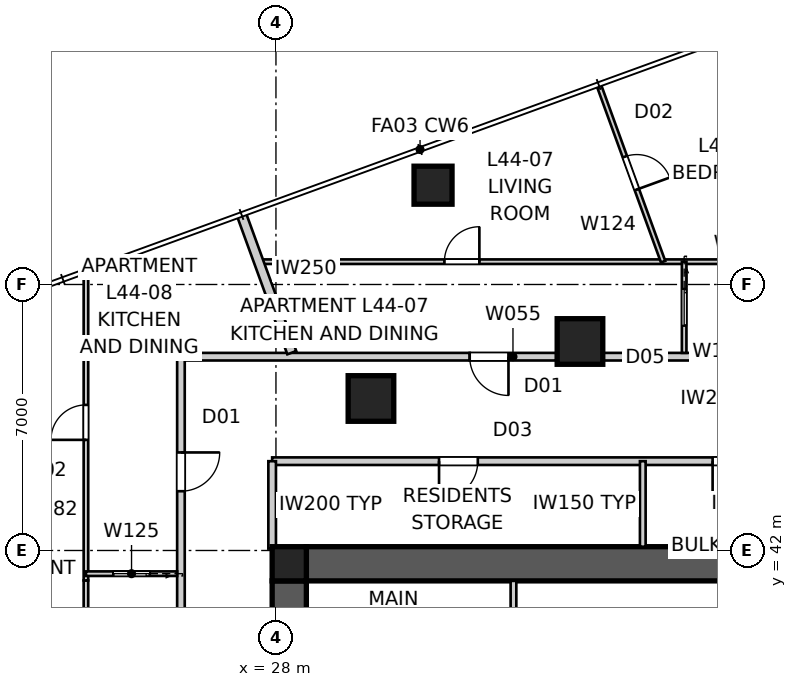
"""IFC4 building model, lengths in metres.
Left out: names, types, materials, properties, quantities, classifications, styles, units other than length and angle.
Written with IfcOpenShell. Run it as: python <this file> out.ifc"""

import sys

from ifc_helpers import new_model, si_unit, direction, frame, frame_2d, origin, origin_2d, place, context, subcontext, project, spatial, polyline, rectangle, outline, extrude, element, fill, save


model = new_model("IFC4")
c1 = context("Model", 3, precision=1e-05, world=origin(), true_north=direction((0.0, 1.0)))
c2 = subcontext(c1, "Body", "Model", "MODEL_VIEW")
j1 = project(units=[si_unit("LENGTHUNIT", "METRE"), si_unit("PLANEANGLEUNIT", "RADIAN")], contexts=[c1])
p1 = place(None, origin())
s1 = spatial("IfcSite", under=j1, at=p1, CompositionType="ELEMENT")
p2 = place(p1, origin())
s2 = spatial("IfcBuilding", under=s1, at=p2, CompositionType="ELEMENT")
p3 = place(p2, frame((0.0, 0.0, 160.8)))
s3 = spatial("IfcBuildingStorey", under=s2, at=p3, CompositionType="ELEMENT", Elevation=160.8)
p4 = place(p3, frame((28.8, 41.65, 0.0), z_axis=(0.0, 0.0, 1.0), x_axis=(1.0, 0.0, 0.0)))
e1 = element("IfcWall", 1, at=p4, inside=s3, PredefinedType="SHEAR", context=c2, shape_type="SweptSolid", body=[
    extrude(outline(polyline([(0.0, -0.45), (22.4, -0.45), (22.4, -0.025), (22.85, -0.025), (22.85, 0.025), (22.4, 0.025), (22.4, 0.45), (0.0, 0.45), (0.0, 0.025), (-0.45, 0.025), (-0.45, -0.025), (0.0, -0.025), (0.0, -0.45)])), origin(), (0.0, 0.0, 1.0), 3.4),
])
p5 = place(p3, frame((28.35, 41.2, 0.0), z_axis=(0.0, 0.0, 1.0), x_axis=(0.0, -1.0, 0.0)))
e2 = element("IfcWall", 2, at=p5, inside=s3, PredefinedType="SHEAR", context=c2, shape_type="SweptSolid", body=[
    extrude(outline(polyline([(0.0, -0.45), (22.4, -0.45), (22.4, -0.025), (22.85, -0.025), (22.85, 0.025), (22.4, 0.025), (22.4, 0.45), (0.0, 0.45), (0.0, 0.025), (-0.45, 0.025), (-0.45, -0.025), (0.0, -0.025), (0.0, -0.45)])), origin(), (0.0, 0.0, 1.0), 3.4),
])
p6 = place(p5, frame((11.14, 0.0, 0.0)))
e3 = element("IfcOpeningElement", 3, at=p6, cuts=e2, PredefinedType="OPENING", context=c2, shape_type="SweptSolid", body=[
    extrude(rectangle(XDim=1.02, YDim=2.4, at=frame_2d((0.51, 1.2))), frame((0.0, 0.46, 0.0), z_axis=(0.0, -1.0, 0.0), x_axis=(1.0, 0.0, 0.0)), (0.0, 0.0, 1.0), 0.92),
])
p7 = place(p3, frame((28.35, 41.65, 0.0), z_axis=(0.0, 0.0, 1.0), x_axis=(1.0, 0.0, 0.0)))
e4 = element("IfcColumn", 4, at=p7, inside=s3, PredefinedType="COLUMN", context=c2, shape_type="SweptSolid", body=[
    extrude(rectangle(XDim=0.9, YDim=0.9, at=origin_2d()), origin(), (0.0, 0.0, 1.0), 3.4),
])
p8 = place(p3, frame((32.134, 51.613, 0.0), z_axis=(0.0, 0.0, 1.0), x_axis=(1.0, 0.0, 0.0)))
e5 = element("IfcColumn", 5, at=p8, inside=s3, PredefinedType="COLUMN", context=c2, shape_type="SweptSolid", body=[
    extrude(rectangle(XDim=1.0, YDim=1.0, at=origin_2d()), origin(), (0.0, 0.0, 1.0), 3.4),
])
for number, where, z_axis, x_axis in (
    (6, (36.0, 47.5, 0.0), (0.0, 0.0, 1.0), (1.0, 0.0, 0.0)),
    (7, (30.5, 46.0, 0.0), (0.0, 0.0, 1.0), (1.0, 0.0, 0.0)),
):
    element("IfcColumn", number, at=place(p3, frame(where, z_axis=z_axis, x_axis=x_axis)), inside=s3, PredefinedType="COLUMN", context=c2, shape_type="SweptSolid", body=[
        extrude(rectangle(XDim=1.2, YDim=1.2, at=origin_2d()), origin(), (0.0, 0.0, 1.0), 3.4),
    ])
p9 = place(p3, frame((44.625, 47.1, 0.0), z_axis=(0.0, 0.0, 1.0), x_axis=(-1.0, 0.0, 0.0)))
e8 = element("IfcWall", 8, at=p9, inside=s3, PredefinedType="PARTITIONING", context=c2, shape_type="SweptSolid", body=[
    extrude(rectangle(XDim=9.25, YDim=0.2, at=frame_2d((4.625, 0.0))), origin(), (0.0, 0.0, 1.0), 3.25),
])
p10 = place(p3, frame((35.375, 47.1, 0.0), z_axis=(0.0, 0.0, 1.0), x_axis=(-1.0, 0.0, 0.0)))
e9 = element("IfcWall", 9, at=p10, inside=s3, PredefinedType="PARTITIONING", context=c2, shape_type="SweptSolid", body=[
    extrude(rectangle(XDim=2.277, YDim=0.2, at=frame_2d((1.138, 0.0))), origin(), (0.0, 0.0, 1.0), 2.55),
])
p11 = place(p10, frame((1.257, 0.0, 0.0)))
e10 = element("IfcOpeningElement", 10, at=p11, cuts=e9, PredefinedType="OPENING", context=c2, shape_type="SweptSolid", body=[
    extrude(rectangle(XDim=1.02, YDim=2.34, at=frame_2d((0.51, 1.17))), frame((0.0, 0.11, 0.0), z_axis=(0.0, -1.0, 0.0), x_axis=(1.0, 0.0, 0.0)), (0.0, 0.0, 1.0), 0.22),
])
p12 = place(p3, frame((33.098, 47.1, 0.0), z_axis=(0.0, 0.0, 1.0), x_axis=(-1.0, 0.0, 0.0)))
e11 = element("IfcWall", 11, at=p12, inside=s3, PredefinedType="PARTITIONING", context=c2, shape_type="SweptSolid", body=[
    extrude(rectangle(XDim=7.598, YDim=0.2, at=frame_2d((3.799, 0.0))), origin(), (0.0, 0.0, 1.0), 3.25),
])
p13 = place(p3, frame((25.5, 47.1, 0.0), z_axis=(0.0, 0.0, 1.0), x_axis=(0.0, -1.0, 0.0)))
e12 = element("IfcWall", 12, at=p13, inside=s3, PredefinedType="PARTITIONING", context=c2, shape_type="SweptSolid", body=[
    extrude(rectangle(XDim=33.4, YDim=0.2, at=frame_2d((16.7, 0.0))), origin(), (0.0, 0.0, 1.0), 3.25),
])
p14 = place(p13, frame((2.52, 0.0, 0.0)))
e13 = element("IfcOpeningElement", 13, at=p14, cuts=e12, PredefinedType="OPENING", context=c2, shape_type="SweptSolid", body=[
    extrude(rectangle(XDim=1.02, YDim=2.34, at=frame_2d((0.51, 1.17))), frame((0.0, 0.11, 0.0), z_axis=(0.0, -1.0, 0.0), x_axis=(1.0, 0.0, 0.0)), (0.0, 0.0, 1.0), 0.22),
])
p15 = place(p13, frame((27.383, 0.0, 0.0)))
e14 = element("IfcOpeningElement", 14, at=p15, cuts=e12, PredefinedType="OPENING", context=c2, shape_type="SweptSolid", body=[
    extrude(rectangle(XDim=1.02, YDim=2.1, at=frame_2d((0.51, 1.05))), frame((0.0, 0.11, 0.0), z_axis=(0.0, -1.0, 0.0), x_axis=(1.0, 0.0, 0.0)), (0.0, 0.0, 1.0), 0.22),
])
p16 = place(p3, frame((27.093, 50.843, 0.0), z_axis=(0.0, 0.0, 1.0), x_axis=(0.342031698406, -0.939688415, 0.0)))
e15 = element("IfcWall", 15, at=p16, inside=s3, PredefinedType="PARTITIONING", context=c2, shape_type="SweptSolid", body=[
    extrude(rectangle(XDim=3.871, YDim=0.25, at=frame_2d((1.936, 0.0))), origin(), (0.0, 0.0, 1.0), 3.25),
])
p17 = place(p3, frame((34.25, 41.2, 0.0), z_axis=(0.0, 0.0, 1.0), x_axis=(0.0, -1.0, 0.0)))
e16 = element("IfcWall", 16, at=p17, inside=s3, PredefinedType="SOLIDWALL", context=c2, shape_type="SweptSolid", body=[
    extrude(rectangle(XDim=5.95, YDim=0.15, at=frame_2d((2.975, 0.0))), origin(), (0.0, 0.0, 1.0), 3.25),
])
p18 = place(p17, frame((2.515, 0.0, 0.0)))
e17 = element("IfcOpeningElement", 17, at=p18, cuts=e16, PredefinedType="OPENING", context=c2, shape_type="SweptSolid", body=[
    extrude(rectangle(XDim=0.92, YDim=2.1, at=frame_2d((0.46, 1.05))), frame((0.0, 0.085, 0.0), z_axis=(0.0, -1.0, 0.0), x_axis=(1.0, 0.0, 0.0)), (0.0, 0.0, 1.0), 0.17),
])
p19 = place(p3, frame((52.1, 44.35, 0.0), z_axis=(0.0, 0.0, 1.0), x_axis=(-1.0, 0.0, 0.0)))
e18 = element("IfcWall", 18, at=p19, inside=s3, PredefinedType="PARTITIONING", context=c2, shape_type="SweptSolid", body=[
    extrude(rectangle(XDim=24.2, YDim=0.2, at=frame_2d((12.1, 0.0))), origin(), (0.0, 0.0, 1.0), 3.25),
])
p20 = place(p19, frame((18.789, 0.0, 0.0)))
e19 = element("IfcOpeningElement", 19, at=p20, cuts=e18, PredefinedType="OPENING", context=c2, shape_type="SweptSolid", body=[
    extrude(rectangle(XDim=1.02, YDim=2.1, at=frame_2d((0.51, 1.05))), frame((0.0, 0.11, 0.0), z_axis=(0.0, -1.0, 0.0), x_axis=(1.0, 0.0, 0.0)), (0.0, 0.0, 1.0), 0.22),
])
p21 = place(p19, frame((4.391, 0.0, 0.0)))
e20 = element("IfcOpeningElement", 20, at=p21, cuts=e18, PredefinedType="OPENING", context=c2, shape_type="SweptSolid", body=[
    extrude(rectangle(XDim=1.02, YDim=2.1, at=frame_2d((0.51, 1.05))), frame((0.0, 0.11, 0.0), z_axis=(0.0, -1.0, 0.0), x_axis=(1.0, 0.0, 0.0)), (0.0, 0.0, 1.0), 0.22),
])
p22 = place(p19, frame((11.59, 0.0, 0.0)))
e21 = element("IfcOpeningElement", 21, at=p22, cuts=e18, PredefinedType="OPENING", context=c2, shape_type="SweptSolid", body=[
    extrude(rectangle(XDim=1.02, YDim=2.1, at=frame_2d((0.51, 1.05))), frame((0.0, 0.11, 0.0), z_axis=(0.0, -1.0, 0.0), x_axis=(1.0, 0.0, 0.0)), (0.0, 0.0, 1.0), 0.22),
])
p23 = place(p3, frame((27.9, 44.35, 0.0), z_axis=(0.0, 0.0, 1.0), x_axis=(0.0, -1.0, 0.0)))
e22 = element("IfcWall", 22, at=p23, inside=s3, PredefinedType="PARTITIONING", context=c2, shape_type="SweptSolid", body=[
    extrude(rectangle(XDim=2.3, YDim=0.2, at=frame_2d((1.15, 0.0))), origin(), (0.0, 0.0, 1.0), 3.25),
])
p24 = place(p3, frame((37.653, 42.1, 0.0), z_axis=(0.0, 0.0, 1.0), x_axis=(0.0, 1.0, 0.0)))
e23 = element("IfcWall", 23, at=p24, inside=s3, PredefinedType="SOLIDWALL", context=c2, shape_type="SweptSolid", body=[
    extrude(rectangle(XDim=2.25, YDim=0.15, at=frame_2d((1.125, 0.0))), origin(), (0.0, 0.0, 1.0), 3.25),
])
p25 = place(p3, frame((23.0, 21.7, 0.0), z_axis=(0.0, 0.0, 1.0), x_axis=(0.0, 1.0, 0.0)))
e24 = element("IfcWall", 24, at=p25, inside=s3, PredefinedType="PARTITIONING", context=c2, shape_type="SweptSolid", body=[
    extrude(rectangle(XDim=19.512, YDim=0.12, at=frame_2d((9.756, 0.0))), origin(), (0.0, 0.0, 1.0), 2.55),
])
p26 = place(p25, frame((14.961, 0.0, 0.0)))
e25 = element("IfcOpeningElement", 25, at=p26, cuts=e24, PredefinedType="OPENING", context=c2, shape_type="SweptSolid", body=[
    extrude(rectangle(XDim=0.96, YDim=2.1, at=frame_2d((0.48, 1.05))), frame((0.0, 0.07, 0.0), z_axis=(0.0, -1.0, 0.0), x_axis=(1.0, 0.0, 0.0)), (0.0, 0.0, 1.0), 0.14),
])
p27 = place(p25, frame((0.641, 0.0, 0.0)))
e26 = element("IfcOpeningElement", 26, at=p27, cuts=e24, PredefinedType="OPENING", context=c2, shape_type="SweptSolid", body=[
    extrude(rectangle(XDim=0.96, YDim=2.1, at=frame_2d((0.48, 1.05))), frame((0.0, 0.07, 0.0), z_axis=(0.0, -1.0, 0.0), x_axis=(1.0, 0.0, 0.0)), (0.0, 0.0, 1.0), 0.14),
])
p28 = place(p25, frame((9.587, 0.0, 0.0)))
e27 = element("IfcOpeningElement", 27, at=p28, cuts=e24, PredefinedType="OPENING", context=c2, shape_type="SweptSolid", body=[
    extrude(rectangle(XDim=0.96, YDim=2.1, at=frame_2d((0.48, 1.05))), frame((0.0, 0.07, 0.0), z_axis=(0.0, -1.0, 0.0), x_axis=(1.0, 0.0, 0.0)), (0.0, 0.0, 1.0), 0.14),
])
p29 = place(p3, frame((27.545, 49.6, 0.0), z_axis=(0.0, 0.0, 1.0), x_axis=(1.0, 0.0, 0.0)))
e28 = element("IfcWall", 28, at=p29, inside=s3, PredefinedType="PARTITIONING", context=c2, shape_type="SweptSolid", body=[
    extrude(rectangle(XDim=29.455, YDim=0.12, at=frame_2d((14.727, 0.0))), origin(), (0.0, 0.0, 1.0), 3.25),
])
p30 = place(p29, frame((4.887, 0.0, 0.0)))
e29 = element("IfcOpeningElement", 29, at=p30, cuts=e28, PredefinedType="OPENING", context=c2, shape_type="SweptSolid", body=[
    extrude(rectangle(XDim=0.92, YDim=2.34, at=frame_2d((0.46, 1.17))), frame((0.0, 0.07, 0.0), z_axis=(0.0, -1.0, 0.0), x_axis=(1.0, 0.0, 0.0)), (0.0, 0.0, 1.0), 0.14),
])
p31 = place(p29, frame((25.418, 0.0, 0.0)))
e30 = element("IfcOpeningElement", 30, at=p31, cuts=e28, PredefinedType="OPENING", context=c2, shape_type="SweptSolid", body=[
    extrude(rectangle(XDim=0.92, YDim=2.34, at=frame_2d((0.46, 1.17))), frame((0.0, 0.07, 0.0), z_axis=(0.0, -1.0, 0.0), x_axis=(1.0, 0.0, 0.0)), (0.0, 0.0, 1.0), 0.14),
])
p32 = place(p29, frame((19.616, 0.0, 0.0)))
e31 = element("IfcOpeningElement", 31, at=p32, cuts=e28, PredefinedType="OPENING", context=c2, shape_type="SweptSolid", body=[
    extrude(rectangle(XDim=0.92, YDim=2.34, at=frame_2d((0.46, 1.17))), frame((0.0, 0.07, 0.0), z_axis=(0.0, -1.0, 0.0), x_axis=(1.0, 0.0, 0.0)), (0.0, 0.0, 1.0), 0.14),
])
p33 = place(p29, frame((21.452, 0.0, 0.0)))
e32 = element("IfcOpeningElement", 32, at=p33, cuts=e28, PredefinedType="OPENING", context=c2, shape_type="SweptSolid", body=[
    extrude(rectangle(XDim=0.92, YDim=2.34, at=frame_2d((0.46, 1.17))), frame((0.0, 0.07, 0.0), z_axis=(0.0, -1.0, 0.0), x_axis=(1.0, 0.0, 0.0)), (0.0, 0.0, 1.0), 0.14),
])
p34 = place(p3, frame((38.741, 49.6, 0.0), z_axis=(0.0, 0.0, 1.0), x_axis=(0.0, -1.0, 0.0)))
e33 = element("IfcWall", 33, at=p34, inside=s3, PredefinedType="PARTITIONING", context=c2, shape_type="SweptSolid", body=[
    extrude(rectangle(XDim=2.4, YDim=0.12, at=frame_2d((1.2, 0.0))), origin(), (0.0, 0.0, 1.0), 3.25),
])
p35 = place(p34, frame((0.72, 0.0, 0.0)))
e34 = element("IfcOpeningElement", 34, at=p35, cuts=e33, PredefinedType="OPENING", context=c2, shape_type="SweptSolid", body=[
    extrude(rectangle(XDim=0.96, YDim=2.1, at=frame_2d((0.48, 1.05))), frame((0.0, 0.07, 0.0), z_axis=(0.0, -1.0, 0.0), x_axis=(1.0, 0.0, 0.0)), (0.0, 0.0, 1.0), 0.14),
])
p36 = place(p3, frame((36.504, 54.225, 0.0), z_axis=(0.0, 0.0, 1.0), x_axis=(0.342017860496, -0.939693451665, 0.0)))
e35 = element("IfcWall", 35, at=p36, inside=s3, PredefinedType="PARTITIONING", context=c2, shape_type="SweptSolid", body=[
    extrude(rectangle(XDim=4.922, YDim=0.12, at=frame_2d((2.461, 0.0))), origin(), (0.0, 0.0, 1.0), 3.25),
])
p37 = place(p36, frame((1.981, 0.0, 0.0)))
e36 = element("IfcOpeningElement", 36, at=p37, cuts=e35, PredefinedType="OPENING", context=c2, shape_type="SweptSolid", body=[
    extrude(rectangle(XDim=0.92, YDim=2.34, at=frame_2d((0.46, 1.17))), frame((0.0, 0.07, 0.0), z_axis=(0.0, -1.0, 0.0), x_axis=(1.0, 0.0, 0.0)), (0.0, 0.0, 1.0), 0.14),
])
p38 = place(p3, frame((25.4, 41.39, 0.0), z_axis=(0.0, 0.0, 1.0), x_axis=(-1.0, 0.0, 0.0)))
e37 = element("IfcWall", 37, at=p38, inside=s3, PredefinedType="PARTITIONING", context=c2, shape_type="SweptSolid", body=[
    extrude(rectangle(XDim=2.4, YDim=0.12, at=frame_2d((1.2, 0.0))), origin(), (0.0, 0.0, 1.0), 3.25),
])
p39 = place(p38, frame((0.72, 0.0, 0.0)))
e38 = element("IfcOpeningElement", 38, at=p39, cuts=e37, PredefinedType="OPENING", context=c2, shape_type="SweptSolid", body=[
    extrude(rectangle(XDim=0.96, YDim=2.1, at=frame_2d((0.48, 1.05))), frame((0.0, 0.07, 0.0), z_axis=(0.0, -1.0, 0.0), x_axis=(1.0, 0.0, 0.0)), (0.0, 0.0, 1.0), 0.14),
])
p40 = place(p3, frame((23.0, 41.212, 0.0), z_axis=(0.0, 0.0, 1.0), x_axis=(0.0, 1.0, 0.0)))
e39 = element("IfcWall", 39, at=p40, inside=s3, PredefinedType="PARTITIONING", context=c2, shape_type="SweptSolid", body=[
    extrude(rectangle(XDim=8.098, YDim=0.12, at=frame_2d((4.049, 0.0))), origin(), (0.0, 0.0, 1.0), 3.25),
])
p41 = place(p40, frame((3.699, 0.0, 0.0)))
e40 = element("IfcOpeningElement", 40, at=p41, cuts=e39, PredefinedType="OPENING", context=c2, shape_type="SweptSolid", body=[
    extrude(rectangle(XDim=0.92, YDim=2.34, at=frame_2d((0.46, 1.17))), frame((0.0, 0.07, 0.0), z_axis=(0.0, -1.0, 0.0), x_axis=(1.0, 0.0, 0.0)), (0.0, 0.0, 1.0), 0.14),
])
p42 = place(p11, origin())
e41 = element("IfcDoor", 41, at=p42, inside=s3, OperationType="SINGLE_SWING_LEFT", PredefinedType="DOOR", context=c2, shape_type="SweptSolid", body=[
    extrude(rectangle(XDim=1.02, YDim=2.34, at=frame_2d((0.51, 1.17))), frame((0.0, 0.025, 0.0), z_axis=(0.0, -1.0, 0.0), x_axis=(1.0, 0.0, 0.0)), (0.0, 0.0, 1.0), 0.05),
])
fill(e10, e41)
p43 = place(p20, origin())
e42 = element("IfcDoor", 42, at=p43, inside=s3, OperationType="SINGLE_SWING_RIGHT", PredefinedType="DOOR", context=c2, shape_type="SweptSolid", body=[
    extrude(rectangle(XDim=1.02, YDim=2.1, at=frame_2d((0.51, 1.05))), frame((0.0, 0.025, 0.0), z_axis=(0.0, -1.0, 0.0), x_axis=(1.0, 0.0, 0.0)), (0.0, 0.0, 1.0), 0.05),
])
fill(e19, e42)
p44 = place(p14, origin())
e43 = element("IfcDoor", 43, at=p44, inside=s3, OperationType="SINGLE_SWING_LEFT", PredefinedType="DOOR", context=c2, shape_type="SweptSolid", body=[
    extrude(rectangle(XDim=1.02, YDim=2.34, at=frame_2d((0.51, 1.17))), frame((0.0, 0.025, 0.0), z_axis=(0.0, -1.0, 0.0), x_axis=(1.0, 0.0, 0.0)), (0.0, 0.0, 1.0), 0.05),
])
fill(e13, e43)
p45 = place(p22, origin())
e44 = element("IfcDoor", 44, at=p45, inside=s3, OperationType="SINGLE_SWING_RIGHT", PredefinedType="DOOR", context=c2, shape_type="SweptSolid", body=[
    extrude(rectangle(XDim=1.02, YDim=2.1, at=frame_2d((0.51, 1.05))), frame((0.0, 0.025, 0.0), z_axis=(0.0, -1.0, 0.0), x_axis=(1.0, 0.0, 0.0)), (0.0, 0.0, 1.0), 0.05),
])
fill(e21, e44)
p46 = place(p30, origin())
e45 = element("IfcDoor", 45, at=p46, inside=s3, OperationType="SINGLE_SWING_RIGHT", PredefinedType="DOOR", context=c2, shape_type="SweptSolid", body=[
    extrude(rectangle(XDim=0.92, YDim=2.34, at=frame_2d((0.46, 1.17))), frame((0.0, 0.025, 0.0), z_axis=(0.0, -1.0, 0.0), x_axis=(1.0, 0.0, 0.0)), (0.0, 0.0, 1.0), 0.05),
])
fill(e29, e45)
p47 = place(p35, origin())
e46 = element("IfcDoor", 46, at=p47, inside=s3, OperationType="SLIDING_TO_LEFT", PredefinedType="DOOR", context=c2, shape_type="SweptSolid", body=[
    extrude(rectangle(XDim=0.96, YDim=2.1, at=frame_2d((0.48, 1.05))), frame((0.0, 0.025, 0.0), z_axis=(0.0, -1.0, 0.0), x_axis=(1.0, 0.0, 0.0)), (0.0, 0.0, 1.0), 0.05),
])
fill(e34, e46)
p48 = place(p41, origin())
e47 = element("IfcDoor", 47, at=p48, inside=s3, OperationType="SINGLE_SWING_LEFT", PredefinedType="DOOR", context=c2, shape_type="SweptSolid", body=[
    extrude(rectangle(XDim=0.92, YDim=2.34, at=frame_2d((0.46, 1.17))), frame((0.0, 0.025, 0.0), z_axis=(0.0, -1.0, 0.0), x_axis=(1.0, 0.0, 0.0)), (0.0, 0.0, 1.0), 0.05),
])
fill(e40, e47)
p49 = place(p39, origin())
e48 = element("IfcDoor", 48, at=p49, inside=s3, OperationType="SLIDING_TO_LEFT", PredefinedType="DOOR", context=c2, shape_type="SweptSolid", body=[
    extrude(rectangle(XDim=0.96, YDim=2.1, at=frame_2d((0.48, 1.05))), frame((0.0, 0.025, 0.0), z_axis=(0.0, -1.0, 0.0), x_axis=(1.0, 0.0, 0.0)), (0.0, 0.0, 1.0), 0.05),
])
fill(e38, e48)
p50 = place(p37, origin())
e49 = element("IfcDoor", 49, at=p50, inside=s3, OperationType="SINGLE_SWING_RIGHT", PredefinedType="DOOR", context=c2, shape_type="SweptSolid", body=[
    extrude(rectangle(XDim=0.92, YDim=2.34, at=frame_2d((0.46, 1.17))), frame((0.0, 0.025, 0.0), z_axis=(0.0, -1.0, 0.0), x_axis=(1.0, 0.0, 0.0)), (0.0, 0.0, 1.0), 0.05),
])
fill(e36, e49)
save(model, sys.argv[1])
